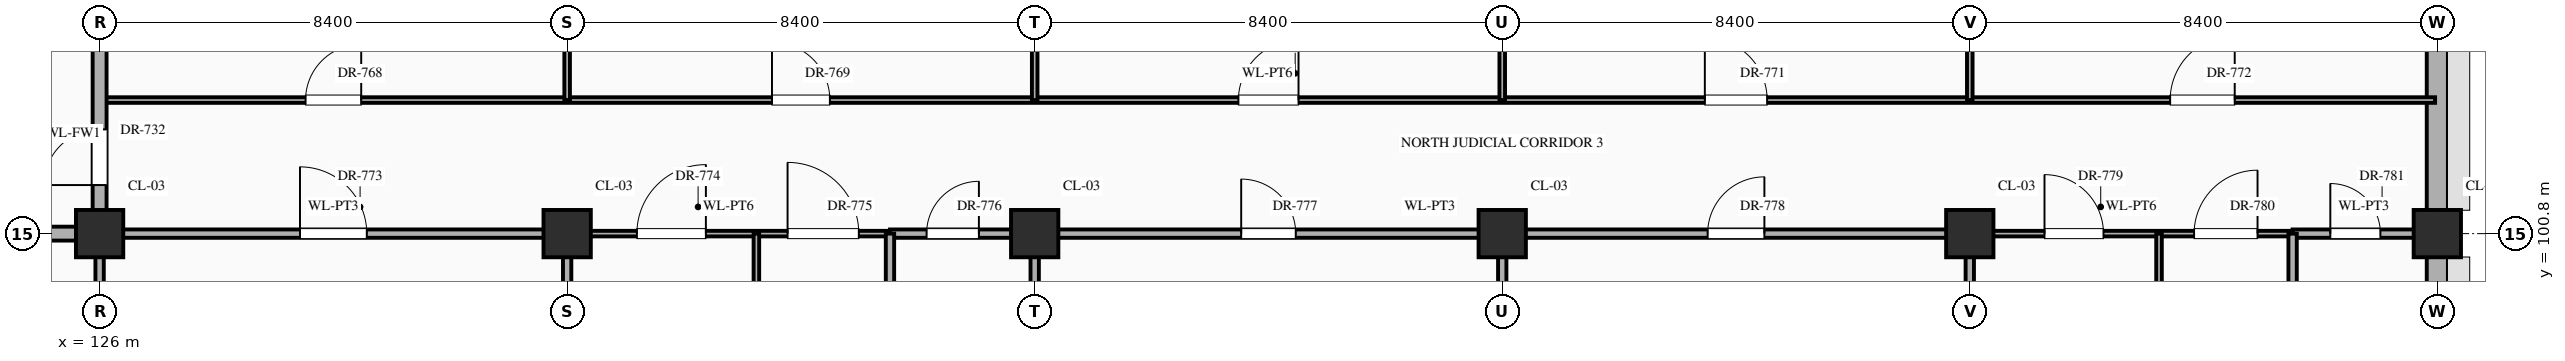
"""IFC4 building model, lengths in metres.
Left out: names, types, materials, properties, quantities, classifications, styles, units other than length and angle.
Written with IfcOpenShell. Run it as: python <this file> out.ifc"""

import sys

from ifc_helpers import new_model, si_unit, direction, frame, frame_2d, origin, origin_2d, place, context, subcontext, project, spatial, rectangle, extrude, element, fill, save


model = new_model("IFC4")
c1 = context("Model", 3, precision=1e-05, world=origin(), true_north=direction((0.0, 1.0)))
c2 = subcontext(c1, "Body", "Model", "MODEL_VIEW")
j1 = project(units=[si_unit("LENGTHUNIT", "METRE"), si_unit("PLANEANGLEUNIT", "RADIAN")], contexts=[c1])
p1 = place(None, origin())
s1 = spatial("IfcSite", under=j1, at=p1, CompositionType="ELEMENT")
p2 = place(p1, origin())
s2 = spatial("IfcBuilding", under=s1, at=p2, CompositionType="ELEMENT")
p3 = place(p2, origin())
s3 = spatial("IfcBuildingStorey", under=s2, at=p3, CompositionType="ELEMENT", Elevation=0.0)
for number, where, z_axis, x_axis in (
    (1, (126.0, 100.8, 0.0), (0.0, 0.0, 1.0), (1.0, 0.0, 0.0)),
    (2, (134.4, 100.8, 0.0), (0.0, 0.0, 1.0), (1.0, 0.0, 0.0)),
    (3, (142.8, 100.8, 0.0), (0.0, 0.0, 1.0), (1.0, 0.0, 0.0)),
    (4, (151.2, 100.8, 0.0), (0.0, 0.0, 1.0), (1.0, 0.0, 0.0)),
    (5, (159.6, 100.8, 0.0), (0.0, 0.0, 1.0), (1.0, 0.0, 0.0)),
    (6, (168.0, 100.8, 0.0), (0.0, 0.0, 1.0), (1.0, 0.0, 0.0)),
):
    element("IfcColumn", number, at=place(p3, frame(where, z_axis=z_axis, x_axis=x_axis)), inside=s3, PredefinedType="COLUMN", context=c2, shape_type="SweptSolid", body=[
        extrude(rectangle(XDim=0.85, YDim=0.85, at=origin_2d()), origin(), (0.0, 0.0, 1.0), 5.4),
    ])
p4 = place(p3, frame((168.0, 94.02, 0.0), z_axis=(0.0, 0.0, 1.0), x_axis=(0.0, 1.0, 0.0)))
e7 = element("IfcWall", 7, at=p4, inside=s3, PredefinedType="STANDARD", context=c2, shape_type="SweptSolid", body=[
    extrude(rectangle(XDim=6.36, YDim=0.38, at=frame_2d((3.18, 0.0))), origin(), (0.0, 0.0, 1.0), 4.47),
])
p5 = place(p4, frame((3.955, 0.0, 0.85)))
e8 = element("IfcOpeningElement", 8, at=p5, cuts=e7, PredefinedType="OPENING", context=c2, shape_type="SweptSolid", body=[
    extrude(rectangle(XDim=1.05, YDim=1.56, at=frame_2d((0.525, 0.78))), frame((0.0, 0.202, 0.0), z_axis=(0.0, -1.0, 0.0), x_axis=(1.0, 0.0, 0.0)), (0.0, 0.0, 1.0), 0.404),
])
p6 = place(p3, frame((168.0, 101.22, 0.0), z_axis=(0.0, 0.0, 1.0), x_axis=(0.0, 1.0, 0.0)))
e9 = element("IfcWall", 9, at=p6, inside=s3, PredefinedType="STANDARD", context=c2, shape_type="SweptSolid", body=[
    extrude(rectangle(XDim=6.36, YDim=0.38, at=frame_2d((3.18, 0.0))), origin(), (0.0, 0.0, 1.0), 4.47),
])
p7 = place(p6, frame((3.955, 0.0, 0.85)))
e10 = element("IfcOpeningElement", 10, at=p7, cuts=e9, PredefinedType="OPENING", context=c2, shape_type="SweptSolid", body=[
    extrude(rectangle(XDim=1.05, YDim=1.74, at=frame_2d((0.525, 0.87))), frame((0.0, 0.202, 0.0), z_axis=(0.0, -1.0, 0.0), x_axis=(1.0, 0.0, 0.0)), (0.0, 0.0, 1.0), 0.404),
])
p8 = place(p3, frame((121.8, 100.8, 0.0), z_axis=(0.0, 0.0, 1.0), x_axis=(1.0, 0.0, 0.0)))
e11 = element("IfcWall", 11, at=p8, inside=s3, PredefinedType="STANDARD", context=c2, shape_type="SweptSolid", body=[
    extrude(rectangle(XDim=4.2, YDim=0.25, at=frame_2d((2.1, 0.0))), origin(), (0.0, 0.0, 1.0), 4.27),
])
p9 = place(p3, frame((126.0, 100.8, 0.0), z_axis=(0.0, 0.0, 1.0), x_axis=(1.0, 0.0, 0.0)))
e12 = element("IfcWall", 12, at=p9, inside=s3, PredefinedType="STANDARD", context=c2, shape_type="SweptSolid", body=[
    extrude(rectangle(XDim=8.4, YDim=0.15, at=frame_2d((4.2, 0.0))), origin(), (0.0, 0.0, 1.0), 4.27),
])
p10 = place(p9, frame((3.6, 0.0, 0.0)))
e13 = element("IfcOpeningElement", 13, at=p10, cuts=e12, PredefinedType="OPENING", context=c2, shape_type="SweptSolid", body=[
    extrude(rectangle(XDim=1.2, YDim=2.35, at=frame_2d((0.6, 1.175))), frame((0.0, 0.087, 0.0), z_axis=(0.0, -1.0, 0.0), x_axis=(1.0, 0.0, 0.0)), (0.0, 0.0, 1.0), 0.174),
])
p11 = place(p3, frame((134.4, 100.8, 0.0), z_axis=(0.0, 0.0, 1.0), x_axis=(1.0, 0.0, 0.0)))
e14 = element("IfcWall", 14, at=p11, inside=s3, PredefinedType="STANDARD", context=c2, shape_type="SweptSolid", body=[
    extrude(rectangle(XDim=5.8, YDim=0.1, at=frame_2d((2.9, 0.0))), origin(), (0.0, 0.0, 1.0), 4.27),
])
p12 = place(p11, frame((1.252, 0.0, 0.0)))
e15 = element("IfcOpeningElement", 15, at=p12, cuts=e14, PredefinedType="OPENING", context=c2, shape_type="SweptSolid", body=[
    extrude(rectangle(XDim=1.24, YDim=2.3, at=frame_2d((0.62, 1.15))), frame((0.0, 0.062, 0.0), z_axis=(0.0, -1.0, 0.0), x_axis=(1.0, 0.0, 0.0)), (0.0, 0.0, 1.0), 0.124),
])
p13 = place(p11, frame((3.96, 0.0, 0.0)))
e16 = element("IfcOpeningElement", 16, at=p13, cuts=e14, PredefinedType="OPENING", context=c2, shape_type="SweptSolid", body=[
    extrude(rectangle(XDim=1.28, YDim=2.35, at=frame_2d((0.64, 1.175))), frame((0.0, 0.062, 0.0), z_axis=(0.0, -1.0, 0.0), x_axis=(1.0, 0.0, 0.0)), (0.0, 0.0, 1.0), 0.124),
])
p14 = place(p3, frame((140.2, 100.8, 0.0), z_axis=(0.0, 0.0, 1.0), x_axis=(1.0, 0.0, 0.0)))
e17 = element("IfcWall", 17, at=p14, inside=s3, PredefinedType="STANDARD", context=c2, shape_type="SweptSolid", body=[
    extrude(rectangle(XDim=19.4, YDim=0.15, at=frame_2d((9.7, 0.0))), origin(), (0.0, 0.0, 1.0), 4.27),
])
p15 = place(p14, frame((0.657, 0.0, 0.0)))
e18 = element("IfcOpeningElement", 18, at=p15, cuts=e17, PredefinedType="OPENING", context=c2, shape_type="SweptSolid", body=[
    extrude(rectangle(XDim=0.94, YDim=2.3, at=frame_2d((0.47, 1.15))), frame((0.0, 0.087, 0.0), z_axis=(0.0, -1.0, 0.0), x_axis=(1.0, 0.0, 0.0)), (0.0, 0.0, 1.0), 0.174),
])
p16 = place(p14, frame((6.31, 0.0, 0.0)))
e19 = element("IfcOpeningElement", 19, at=p16, cuts=e17, PredefinedType="OPENING", context=c2, shape_type="SweptSolid", body=[
    extrude(rectangle(XDim=0.98, YDim=2.35, at=frame_2d((0.49, 1.175))), frame((0.0, 0.087, 0.0), z_axis=(0.0, -1.0, 0.0), x_axis=(1.0, 0.0, 0.0)), (0.0, 0.0, 1.0), 0.174),
])
p17 = place(p14, frame((14.69, 0.0, 0.0)))
e20 = element("IfcOpeningElement", 20, at=p17, cuts=e17, PredefinedType="OPENING", context=c2, shape_type="SweptSolid", body=[
    extrude(rectangle(XDim=1.02, YDim=2.4, at=frame_2d((0.51, 1.2))), frame((0.0, 0.087, 0.0), z_axis=(0.0, -1.0, 0.0), x_axis=(1.0, 0.0, 0.0)), (0.0, 0.0, 1.0), 0.174),
])
p18 = place(p3, frame((159.6, 100.8, 0.0), z_axis=(0.0, 0.0, 1.0), x_axis=(1.0, 0.0, 0.0)))
e21 = element("IfcWall", 21, at=p18, inside=s3, PredefinedType="STANDARD", context=c2, shape_type="SweptSolid", body=[
    extrude(rectangle(XDim=5.8, YDim=0.1, at=frame_2d((2.9, 0.0))), origin(), (0.0, 0.0, 1.0), 4.27),
])
p19 = place(p18, frame((1.343, 0.0, 0.0)))
e22 = element("IfcOpeningElement", 22, at=p19, cuts=e21, PredefinedType="OPENING", context=c2, shape_type="SweptSolid", body=[
    extrude(rectangle(XDim=1.06, YDim=2.4, at=frame_2d((0.53, 1.2))), frame((0.0, 0.062, 0.0), z_axis=(0.0, -1.0, 0.0), x_axis=(1.0, 0.0, 0.0)), (0.0, 0.0, 1.0), 0.124),
])
p20 = place(p18, frame((4.03, 0.0, 0.0)))
e23 = element("IfcOpeningElement", 23, at=p20, cuts=e21, PredefinedType="OPENING", context=c2, shape_type="SweptSolid", body=[
    extrude(rectangle(XDim=1.14, YDim=2.4, at=frame_2d((0.57, 1.2))), frame((0.0, 0.062, 0.0), z_axis=(0.0, -1.0, 0.0), x_axis=(1.0, 0.0, 0.0)), (0.0, 0.0, 1.0), 0.124),
])
p21 = place(p3, frame((165.4, 100.8, 0.0), z_axis=(0.0, 0.0, 1.0), x_axis=(1.0, 0.0, 0.0)))
e24 = element("IfcWall", 24, at=p21, inside=s3, PredefinedType="STANDARD", context=c2, shape_type="SweptSolid", body=[
    extrude(rectangle(XDim=2.56, YDim=0.15, at=frame_2d((1.28, 0.0))), origin(), (0.0, 0.0, 1.0), 4.27),
])
p22 = place(p21, frame((0.677, 0.0, 0.0)))
e25 = element("IfcOpeningElement", 25, at=p22, cuts=e24, PredefinedType="OPENING", context=c2, shape_type="SweptSolid", body=[
    extrude(rectangle(XDim=0.9, YDim=2.15, at=frame_2d((0.45, 1.075))), frame((0.0, 0.087, 0.0), z_axis=(0.0, -1.0, 0.0), x_axis=(1.0, 0.0, 0.0)), (0.0, 0.0, 1.0), 0.174),
])
p23 = place(p3, frame((126.0, 103.2, 0.0), z_axis=(0.0, 0.0, 1.0), x_axis=(1.0, 0.0, 0.0)))
e26 = element("IfcWall", 26, at=p23, inside=s3, PredefinedType="STANDARD", context=c2, shape_type="SweptSolid", body=[
    extrude(rectangle(XDim=41.96, YDim=0.1, at=frame_2d((20.98, 0.0))), origin(), (0.0, 0.0, 1.0), 5.12),
])
p24 = place(p23, frame((3.7, 0.0, 0.0)))
e27 = element("IfcOpeningElement", 27, at=p24, cuts=e26, PredefinedType="OPENING", context=c2, shape_type="SweptSolid", body=[
    extrude(rectangle(XDim=1.0, YDim=2.25, at=frame_2d((0.5, 1.125))), frame((0.0, 0.062, 0.0), z_axis=(0.0, -1.0, 0.0), x_axis=(1.0, 0.0, 0.0)), (0.0, 0.0, 1.0), 0.124),
])
p25 = place(p23, frame((12.08, 0.0, 0.0)))
e28 = element("IfcOpeningElement", 28, at=p25, cuts=e26, PredefinedType="OPENING", context=c2, shape_type="SweptSolid", body=[
    extrude(rectangle(XDim=1.04, YDim=2.2, at=frame_2d((0.52, 1.1))), frame((0.0, 0.062, 0.0), z_axis=(0.0, -1.0, 0.0), x_axis=(1.0, 0.0, 0.0)), (0.0, 0.0, 1.0), 0.124),
])
p26 = place(p23, frame((20.46, 0.0, 0.0)))
e29 = element("IfcOpeningElement", 29, at=p26, cuts=e26, PredefinedType="OPENING", context=c2, shape_type="SweptSolid", body=[
    extrude(rectangle(XDim=1.08, YDim=2.25, at=frame_2d((0.54, 1.125))), frame((0.0, 0.062, 0.0), z_axis=(0.0, -1.0, 0.0), x_axis=(1.0, 0.0, 0.0)), (0.0, 0.0, 1.0), 0.124),
])
p27 = place(p23, frame((28.84, 0.0, 0.0)))
e30 = element("IfcOpeningElement", 30, at=p27, cuts=e26, PredefinedType="OPENING", context=c2, shape_type="SweptSolid", body=[
    extrude(rectangle(XDim=1.12, YDim=2.25, at=frame_2d((0.56, 1.125))), frame((0.0, 0.062, 0.0), z_axis=(0.0, -1.0, 0.0), x_axis=(1.0, 0.0, 0.0)), (0.0, 0.0, 1.0), 0.124),
])
p28 = place(p23, frame((37.2, 0.0, 0.0)))
e31 = element("IfcOpeningElement", 31, at=p28, cuts=e26, PredefinedType="OPENING", context=c2, shape_type="SweptSolid", body=[
    extrude(rectangle(XDim=1.16, YDim=2.3, at=frame_2d((0.58, 1.15))), frame((0.0, 0.062, 0.0), z_axis=(0.0, -1.0, 0.0), x_axis=(1.0, 0.0, 0.0)), (0.0, 0.0, 1.0), 0.124),
])
p29 = place(p3, frame((126.0, 96.0, 0.0), z_axis=(0.0, 0.0, 1.0), x_axis=(0.0, 1.0, 0.0)))
e32 = element("IfcWall", 32, at=p29, inside=s3, PredefinedType="STANDARD", context=c2, shape_type="SweptSolid", body=[
    extrude(rectangle(XDim=4.8, YDim=0.15, at=frame_2d((2.4, 0.0))), origin(), (0.0, 0.0, 1.0), 4.37),
])
p30 = place(p3, frame((126.0, 100.8, 0.0), z_axis=(0.0, 0.0, 1.0), x_axis=(0.0, 1.0, 0.0)))
e33 = element("IfcWall", 33, at=p30, inside=s3, PredefinedType="STANDARD", context=c2, shape_type="SweptSolid", body=[
    extrude(rectangle(XDim=3.6, YDim=0.25, at=frame_2d((1.8, 0.0))), origin(), (0.0, 0.0, 1.0), 4.37),
])
p31 = place(p30, frame((0.873, 0.0, 0.0)))
e34 = element("IfcOpeningElement", 34, at=p31, cuts=e33, PredefinedType="OPENING", context=c2, shape_type="SweptSolid", body=[
    extrude(rectangle(XDim=1.0, YDim=2.2, at=frame_2d((0.5, 1.1))), frame((0.0, 0.137, 0.0), z_axis=(0.0, -1.0, 0.0), x_axis=(1.0, 0.0, 0.0)), (0.0, 0.0, 1.0), 0.274),
])
p32 = place(p3, frame((134.4, 96.0, 0.0), z_axis=(0.0, 0.0, 1.0), x_axis=(0.0, 1.0, 0.0)))
e35 = element("IfcWall", 35, at=p32, inside=s3, PredefinedType="STANDARD", context=c2, shape_type="SweptSolid", body=[
    extrude(rectangle(XDim=4.8, YDim=0.15, at=frame_2d((2.4, 0.0))), origin(), (0.0, 0.0, 1.0), 4.37),
])
p33 = place(p3, frame((134.4, 103.2, 0.0), z_axis=(0.0, 0.0, 1.0), x_axis=(0.0, 1.0, 0.0)))
e36 = element("IfcWall", 36, at=p33, inside=s3, PredefinedType="STANDARD", context=c2, shape_type="SweptSolid", body=[
    extrude(rectangle(XDim=4.76, YDim=0.1, at=frame_2d((2.38, 0.0))), origin(), (0.0, 0.0, 1.0), 4.37),
])
p34 = place(p3, frame((137.8, 96.0, 0.0), z_axis=(0.0, 0.0, 1.0), x_axis=(0.0, 1.0, 0.0)))
e37 = element("IfcWall", 37, at=p34, inside=s3, PredefinedType="STANDARD", context=c2, shape_type="SweptSolid", body=[
    extrude(rectangle(XDim=4.8, YDim=0.1, at=frame_2d((2.4, 0.0))), origin(), (0.0, 0.0, 1.0), 5.12),
])
p35 = place(p34, frame((1.9, 0.0, 0.0)))
e38 = element("IfcOpeningElement", 38, at=p35, cuts=e37, PredefinedType="OPENING", context=c2, shape_type="SweptSolid", body=[
    extrude(rectangle(XDim=1.0, YDim=2.25, at=frame_2d((0.5, 1.125))), frame((0.0, 0.062, 0.0), z_axis=(0.0, -1.0, 0.0), x_axis=(1.0, 0.0, 0.0)), (0.0, 0.0, 1.0), 0.124),
])
p36 = place(p3, frame((140.2, 96.0, 0.0), z_axis=(0.0, 0.0, 1.0), x_axis=(0.0, 1.0, 0.0)))
e39 = element("IfcWall", 39, at=p36, inside=s3, PredefinedType="STANDARD", context=c2, shape_type="SweptSolid", body=[
    extrude(rectangle(XDim=4.8, YDim=0.15, at=frame_2d((2.4, 0.0))), origin(), (0.0, 0.0, 1.0), 5.12),
])
p37 = place(p36, frame((1.88, 0.0, 0.0)))
e40 = element("IfcOpeningElement", 40, at=p37, cuts=e39, PredefinedType="OPENING", context=c2, shape_type="SweptSolid", body=[
    extrude(rectangle(XDim=1.04, YDim=2.2, at=frame_2d((0.52, 1.1))), frame((0.0, 0.087, 0.0), z_axis=(0.0, -1.0, 0.0), x_axis=(1.0, 0.0, 0.0)), (0.0, 0.0, 1.0), 0.174),
])
p38 = place(p3, frame((142.8, 96.0, 0.0), z_axis=(0.0, 0.0, 1.0), x_axis=(0.0, 1.0, 0.0)))
e41 = element("IfcWall", 41, at=p38, inside=s3, PredefinedType="STANDARD", context=c2, shape_type="SweptSolid", body=[
    extrude(rectangle(XDim=4.8, YDim=0.15, at=frame_2d((2.4, 0.0))), origin(), (0.0, 0.0, 1.0), 4.37),
])
p39 = place(p3, frame((142.8, 103.2, 0.0), z_axis=(0.0, 0.0, 1.0), x_axis=(0.0, 1.0, 0.0)))
e42 = element("IfcWall", 42, at=p39, inside=s3, PredefinedType="STANDARD", context=c2, shape_type="SweptSolid", body=[
    extrude(rectangle(XDim=4.76, YDim=0.1, at=frame_2d((2.38, 0.0))), origin(), (0.0, 0.0, 1.0), 4.37),
])
p40 = place(p3, frame((151.2, 96.0, 0.0), z_axis=(0.0, 0.0, 1.0), x_axis=(0.0, 1.0, 0.0)))
e43 = element("IfcWall", 43, at=p40, inside=s3, PredefinedType="STANDARD", context=c2, shape_type="SweptSolid", body=[
    extrude(rectangle(XDim=4.8, YDim=0.15, at=frame_2d((2.4, 0.0))), origin(), (0.0, 0.0, 1.0), 4.37),
])
p41 = place(p3, frame((151.2, 103.2, 0.0), z_axis=(0.0, 0.0, 1.0), x_axis=(0.0, 1.0, 0.0)))
e44 = element("IfcWall", 44, at=p41, inside=s3, PredefinedType="STANDARD", context=c2, shape_type="SweptSolid", body=[
    extrude(rectangle(XDim=4.76, YDim=0.1, at=frame_2d((2.38, 0.0))), origin(), (0.0, 0.0, 1.0), 4.37),
])
p42 = place(p3, frame((159.6, 96.0, 0.0), z_axis=(0.0, 0.0, 1.0), x_axis=(0.0, 1.0, 0.0)))
e45 = element("IfcWall", 45, at=p42, inside=s3, PredefinedType="STANDARD", context=c2, shape_type="SweptSolid", body=[
    extrude(rectangle(XDim=4.8, YDim=0.15, at=frame_2d((2.4, 0.0))), origin(), (0.0, 0.0, 1.0), 4.37),
])
p43 = place(p3, frame((159.6, 103.2, 0.0), z_axis=(0.0, 0.0, 1.0), x_axis=(0.0, 1.0, 0.0)))
e46 = element("IfcWall", 46, at=p43, inside=s3, PredefinedType="STANDARD", context=c2, shape_type="SweptSolid", body=[
    extrude(rectangle(XDim=4.76, YDim=0.1, at=frame_2d((2.38, 0.0))), origin(), (0.0, 0.0, 1.0), 4.37),
])
p44 = place(p3, frame((163.0, 96.0, 0.0), z_axis=(0.0, 0.0, 1.0), x_axis=(0.0, 1.0, 0.0)))
e47 = element("IfcWall", 47, at=p44, inside=s3, PredefinedType="STANDARD", context=c2, shape_type="SweptSolid", body=[
    extrude(rectangle(XDim=4.8, YDim=0.1, at=frame_2d((2.4, 0.0))), origin(), (0.0, 0.0, 1.0), 5.12),
])
p45 = place(p44, frame((1.86, 0.0, 0.0)))
e48 = element("IfcOpeningElement", 48, at=p45, cuts=e47, PredefinedType="OPENING", context=c2, shape_type="SweptSolid", body=[
    extrude(rectangle(XDim=1.08, YDim=2.25, at=frame_2d((0.54, 1.125))), frame((0.0, 0.062, 0.0), z_axis=(0.0, -1.0, 0.0), x_axis=(1.0, 0.0, 0.0)), (0.0, 0.0, 1.0), 0.124),
])
p46 = place(p3, frame((165.4, 96.0, 0.0), z_axis=(0.0, 0.0, 1.0), x_axis=(0.0, 1.0, 0.0)))
e49 = element("IfcWall", 49, at=p46, inside=s3, PredefinedType="STANDARD", context=c2, shape_type="SweptSolid", body=[
    extrude(rectangle(XDim=4.8, YDim=0.15, at=frame_2d((2.4, 0.0))), origin(), (0.0, 0.0, 1.0), 5.12),
])
p47 = place(p46, frame((1.84, 0.0, 0.0)))
e50 = element("IfcOpeningElement", 50, at=p47, cuts=e49, PredefinedType="OPENING", context=c2, shape_type="SweptSolid", body=[
    extrude(rectangle(XDim=1.12, YDim=2.25, at=frame_2d((0.56, 1.125))), frame((0.0, 0.087, 0.0), z_axis=(0.0, -1.0, 0.0), x_axis=(1.0, 0.0, 0.0)), (0.0, 0.0, 1.0), 0.174),
])
p48 = place(p31, origin())
e51 = element("IfcDoor", 51, at=p48, inside=s3, OperationType="SINGLE_SWING_LEFT", PredefinedType="DOOR", context=c2, shape_type="SweptSolid", body=[
    extrude(rectangle(XDim=1.0, YDim=2.2, at=frame_2d((0.5, 1.1))), frame((0.0, 0.025, 0.0), z_axis=(0.0, -1.0, 0.0), x_axis=(1.0, 0.0, 0.0)), (0.0, 0.0, 1.0), 0.05),
])
fill(e34, e51)
p49 = place(p24, origin())
e52 = element("IfcDoor", 52, at=p49, inside=s3, OperationType="SINGLE_SWING_RIGHT", PredefinedType="DOOR", context=c2, shape_type="SweptSolid", body=[
    extrude(rectangle(XDim=1.0, YDim=2.25, at=frame_2d((0.5, 1.125))), frame((0.0, 0.025, 0.0), z_axis=(0.0, -1.0, 0.0), x_axis=(1.0, 0.0, 0.0)), (0.0, 0.0, 1.0), 0.05),
])
fill(e27, e52)
p50 = place(p25, origin())
e53 = element("IfcDoor", 53, at=p50, inside=s3, OperationType="SINGLE_SWING_LEFT", PredefinedType="DOOR", context=c2, shape_type="SweptSolid", body=[
    extrude(rectangle(XDim=1.04, YDim=2.2, at=frame_2d((0.52, 1.1))), frame((0.0, 0.025, 0.0), z_axis=(0.0, -1.0, 0.0), x_axis=(1.0, 0.0, 0.0)), (0.0, 0.0, 1.0), 0.05),
])
fill(e28, e53)
p51 = place(p26, origin())
e54 = element("IfcDoor", 54, at=p51, inside=s3, OperationType="SINGLE_SWING_RIGHT", PredefinedType="DOOR", context=c2, shape_type="SweptSolid", body=[
    extrude(rectangle(XDim=1.08, YDim=2.25, at=frame_2d((0.54, 1.125))), frame((0.0, 0.025, 0.0), z_axis=(0.0, -1.0, 0.0), x_axis=(1.0, 0.0, 0.0)), (0.0, 0.0, 1.0), 0.05),
])
fill(e29, e54)
p52 = place(p27, origin())
e55 = element("IfcDoor", 55, at=p52, inside=s3, OperationType="SINGLE_SWING_LEFT", PredefinedType="DOOR", context=c2, shape_type="SweptSolid", body=[
    extrude(rectangle(XDim=1.12, YDim=2.25, at=frame_2d((0.56, 1.125))), frame((0.0, 0.025, 0.0), z_axis=(0.0, -1.0, 0.0), x_axis=(1.0, 0.0, 0.0)), (0.0, 0.0, 1.0), 0.05),
])
fill(e30, e55)
p53 = place(p28, origin())
e56 = element("IfcDoor", 56, at=p53, inside=s3, OperationType="SINGLE_SWING_RIGHT", PredefinedType="DOOR", context=c2, shape_type="SweptSolid", body=[
    extrude(rectangle(XDim=1.16, YDim=2.3, at=frame_2d((0.58, 1.15))), frame((0.0, 0.025, 0.0), z_axis=(0.0, -1.0, 0.0), x_axis=(1.0, 0.0, 0.0)), (0.0, 0.0, 1.0), 0.05),
])
fill(e31, e56)
p54 = place(p10, origin())
e57 = element("IfcDoor", 57, at=p54, inside=s3, OperationType="SINGLE_SWING_LEFT", PredefinedType="DOOR", context=c2, shape_type="SweptSolid", body=[
    extrude(rectangle(XDim=1.2, YDim=2.35, at=frame_2d((0.6, 1.175))), frame((0.0, 0.025, 0.0), z_axis=(0.0, -1.0, 0.0), x_axis=(1.0, 0.0, 0.0)), (0.0, 0.0, 1.0), 0.05),
])
fill(e13, e57)
p55 = place(p12, origin())
e58 = element("IfcDoor", 58, at=p55, inside=s3, OperationType="SINGLE_SWING_RIGHT", PredefinedType="DOOR", context=c2, shape_type="SweptSolid", body=[
    extrude(rectangle(XDim=1.24, YDim=2.3, at=frame_2d((0.62, 1.15))), frame((0.0, 0.025, 0.0), z_axis=(0.0, -1.0, 0.0), x_axis=(1.0, 0.0, 0.0)), (0.0, 0.0, 1.0), 0.05),
])
fill(e15, e58)
p56 = place(p13, origin())
e59 = element("IfcDoor", 59, at=p56, inside=s3, OperationType="SINGLE_SWING_LEFT", PredefinedType="DOOR", context=c2, shape_type="SweptSolid", body=[
    extrude(rectangle(XDim=1.28, YDim=2.35, at=frame_2d((0.64, 1.175))), frame((0.0, 0.025, 0.0), z_axis=(0.0, -1.0, 0.0), x_axis=(1.0, 0.0, 0.0)), (0.0, 0.0, 1.0), 0.05),
])
fill(e16, e59)
p57 = place(p15, origin())
e60 = element("IfcDoor", 60, at=p57, inside=s3, OperationType="SINGLE_SWING_RIGHT", PredefinedType="DOOR", context=c2, shape_type="SweptSolid", body=[
    extrude(rectangle(XDim=0.94, YDim=2.3, at=frame_2d((0.47, 1.15))), frame((0.0, 0.025, 0.0), z_axis=(0.0, -1.0, 0.0), x_axis=(1.0, 0.0, 0.0)), (0.0, 0.0, 1.0), 0.05),
])
fill(e18, e60)
p58 = place(p16, origin())
e61 = element("IfcDoor", 61, at=p58, inside=s3, OperationType="SINGLE_SWING_LEFT", PredefinedType="DOOR", context=c2, shape_type="SweptSolid", body=[
    extrude(rectangle(XDim=0.98, YDim=2.35, at=frame_2d((0.49, 1.175))), frame((0.0, 0.025, 0.0), z_axis=(0.0, -1.0, 0.0), x_axis=(1.0, 0.0, 0.0)), (0.0, 0.0, 1.0), 0.05),
])
fill(e19, e61)
p59 = place(p17, origin())
e62 = element("IfcDoor", 62, at=p59, inside=s3, OperationType="SINGLE_SWING_RIGHT", PredefinedType="DOOR", context=c2, shape_type="SweptSolid", body=[
    extrude(rectangle(XDim=1.02, YDim=2.4, at=frame_2d((0.51, 1.2))), frame((0.0, 0.025, 0.0), z_axis=(0.0, -1.0, 0.0), x_axis=(1.0, 0.0, 0.0)), (0.0, 0.0, 1.0), 0.05),
])
fill(e20, e62)
p60 = place(p19, origin())
e63 = element("IfcDoor", 63, at=p60, inside=s3, OperationType="SINGLE_SWING_LEFT", PredefinedType="DOOR", context=c2, shape_type="SweptSolid", body=[
    extrude(rectangle(XDim=1.06, YDim=2.4, at=frame_2d((0.53, 1.2))), frame((0.0, 0.025, 0.0), z_axis=(0.0, -1.0, 0.0), x_axis=(1.0, 0.0, 0.0)), (0.0, 0.0, 1.0), 0.05),
])
fill(e22, e63)
p61 = place(p20, origin())
e64 = element("IfcDoor", 64, at=p61, inside=s3, OperationType="SINGLE_SWING_RIGHT", PredefinedType="DOOR", context=c2, shape_type="SweptSolid", body=[
    extrude(rectangle(XDim=1.14, YDim=2.4, at=frame_2d((0.57, 1.2))), frame((0.0, 0.025, 0.0), z_axis=(0.0, -1.0, 0.0), x_axis=(1.0, 0.0, 0.0)), (0.0, 0.0, 1.0), 0.05),
])
fill(e23, e64)
p62 = place(p22, origin())
e65 = element("IfcDoor", 65, at=p62, inside=s3, OperationType="SINGLE_SWING_LEFT", PredefinedType="DOOR", context=c2, shape_type="SweptSolid", body=[
    extrude(rectangle(XDim=0.9, YDim=2.15, at=frame_2d((0.45, 1.075))), frame((0.0, 0.025, 0.0), z_axis=(0.0, -1.0, 0.0), x_axis=(1.0, 0.0, 0.0)), (0.0, 0.0, 1.0), 0.05),
])
fill(e25, e65)
save(model, sys.argv[1])
